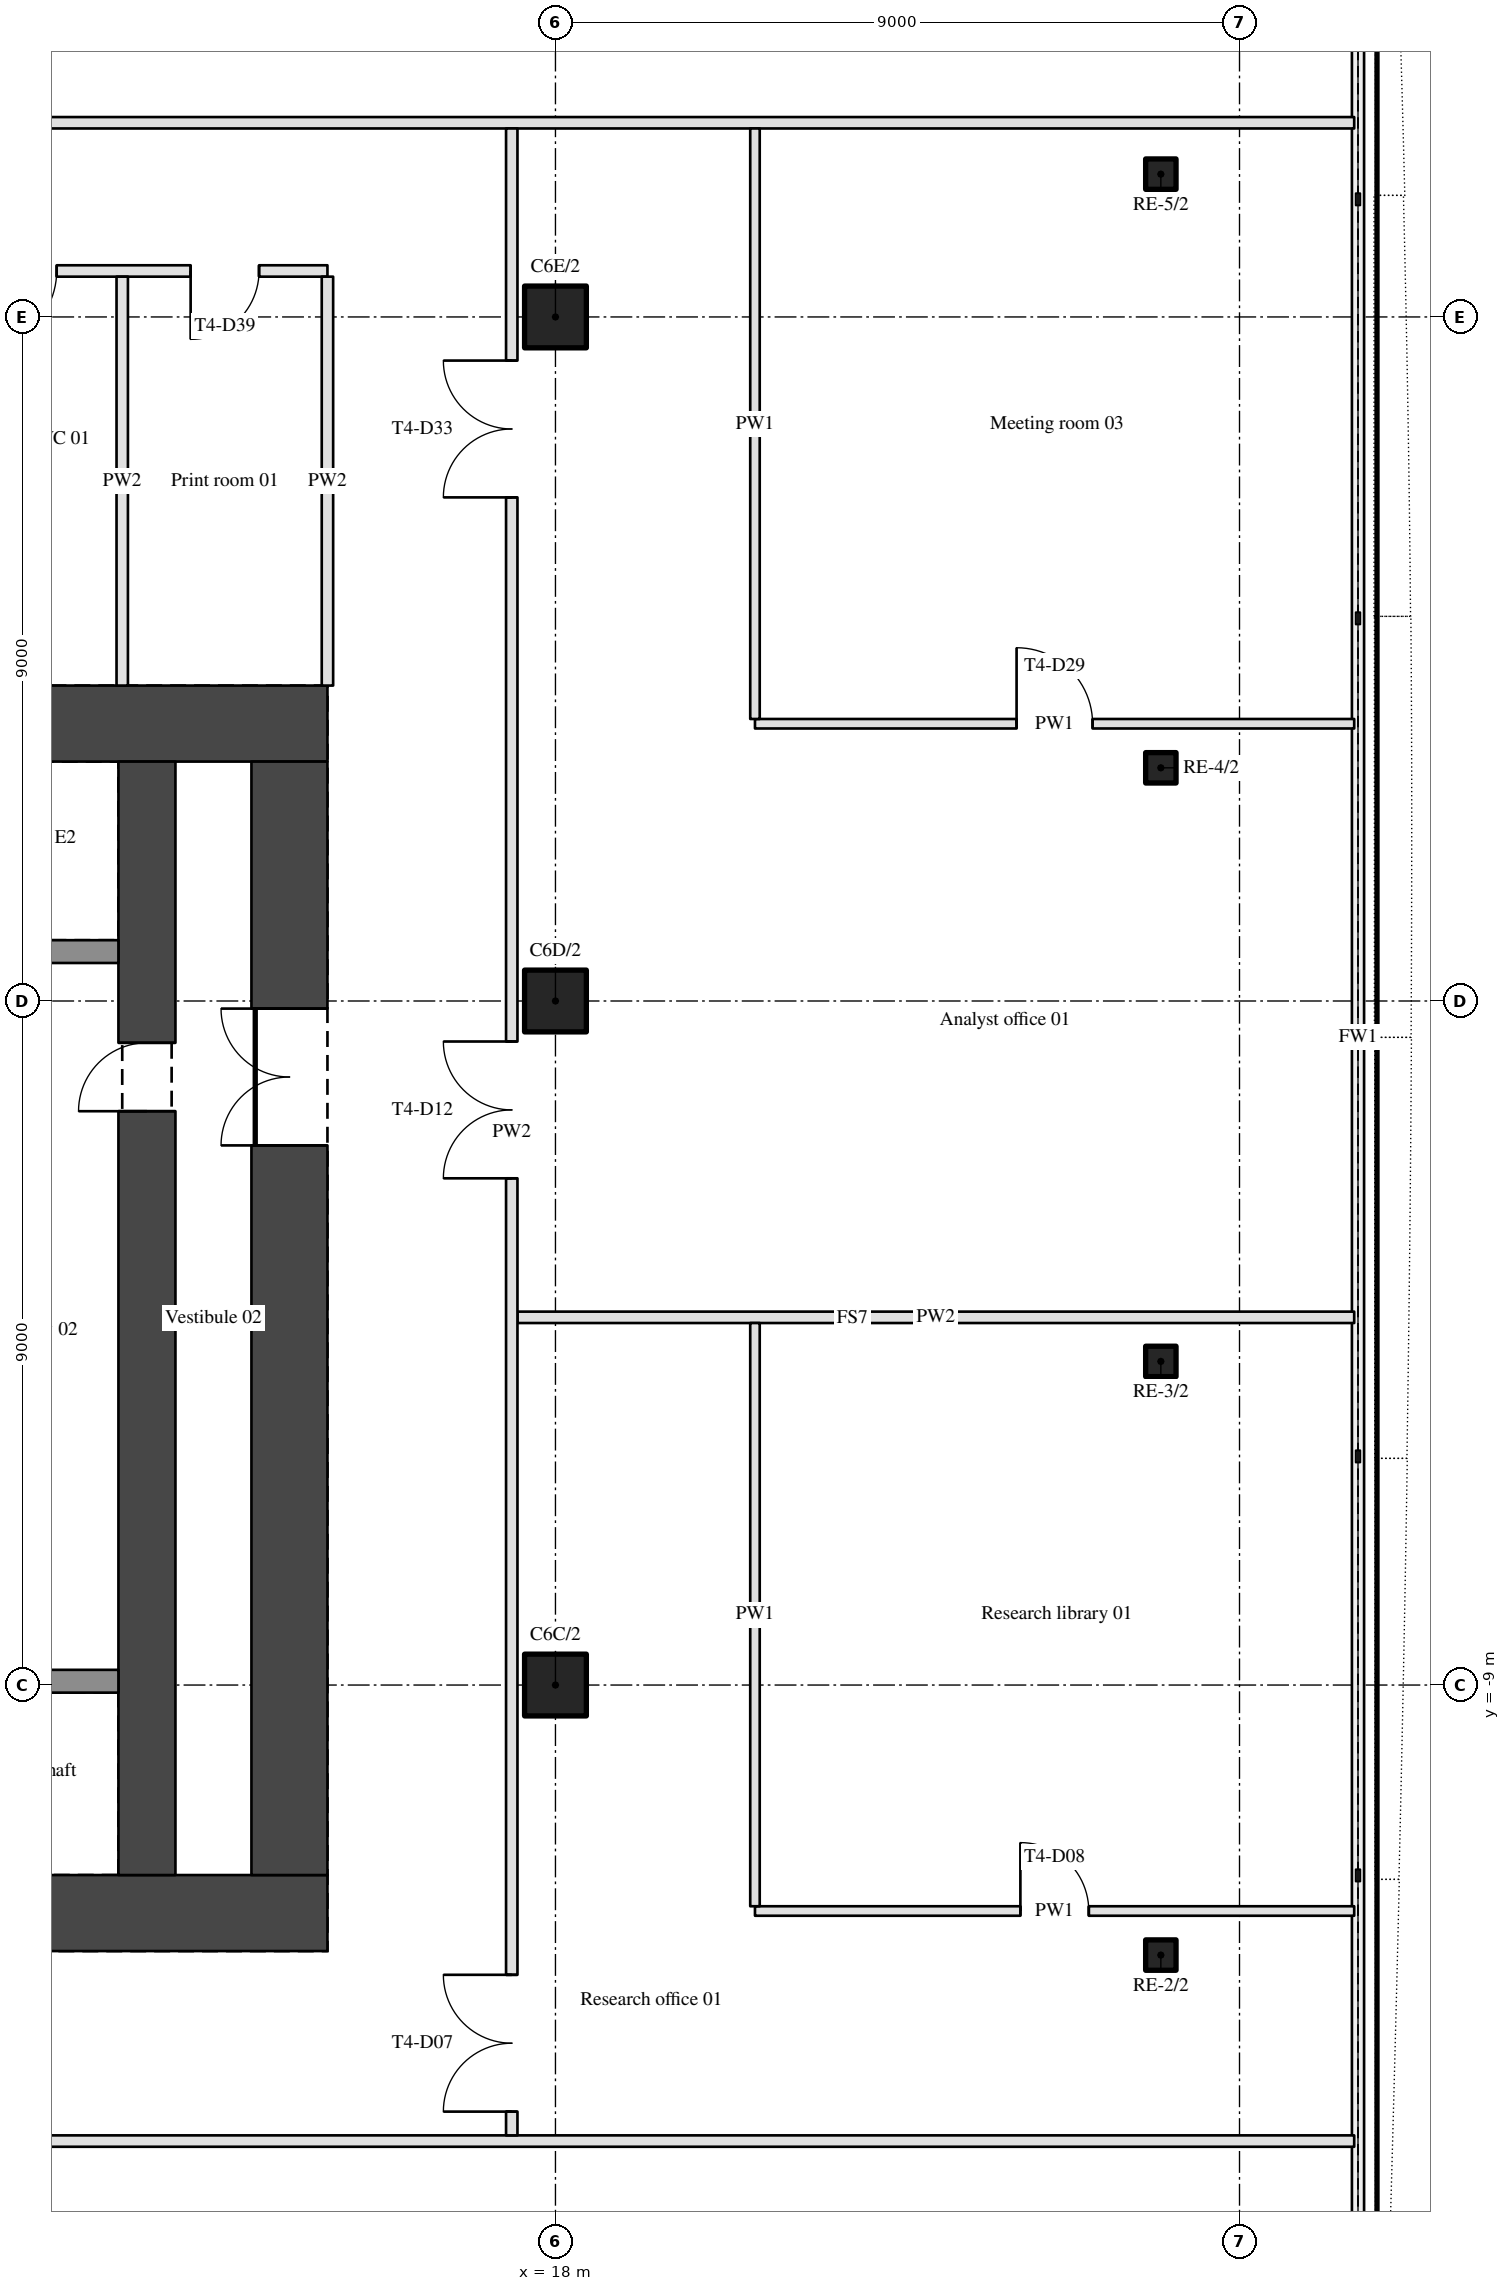
"""IFC4 building model, lengths in metres.
Left out: names, types, materials, properties, quantities, classifications, styles, units other than length and angle.
Written with IfcOpenShell. Run it as: python <this file> out.ifc"""

import sys

from ifc_helpers import new_model, si_unit, direction, frame, frame_2d, origin, origin_2d, place, context, subcontext, project, spatial, rectangle, hollow_rectangle, hollow_circle, extrude, element, fill, save


model = new_model("IFC4")
c1 = context("Model", 3, precision=1e-05, world=origin(), true_north=direction((0.0, 1.0)))
c2 = subcontext(c1, "Body", "Model", "MODEL_VIEW")
j1 = project(units=[si_unit("LENGTHUNIT", "METRE"), si_unit("PLANEANGLEUNIT", "RADIAN")], contexts=[c1])
p1 = place(None, origin())
s1 = spatial("IfcSite", under=j1, at=p1, CompositionType="ELEMENT")
p2 = place(p1, origin())
s2 = spatial("IfcBuilding", under=s1, at=p2, CompositionType="ELEMENT")
p3 = place(p2, frame((0.0, 0.0, 62.1)))
s3 = spatial("IfcBuildingStorey", under=s2, at=p3, CompositionType="ELEMENT", Elevation=62.1)
for number, where, z_axis, x_axis in (
    (1, (18.0, -9.0, 0.0), (0.0, 0.0, 1.0), (1.0, 0.0, 0.0)),
    (2, (18.0, 0.0, 0.0), (0.0, 0.0, 1.0), (1.0, 0.0, 0.0)),
    (3, (18.0, 9.0, 0.0), (0.0, 0.0, 1.0), (1.0, 0.0, 0.0)),
):
    element("IfcColumn", number, at=place(p3, frame(where, z_axis=z_axis, x_axis=x_axis)), inside=s3, PredefinedType="COLUMN", context=c2, shape_type="SweptSolid", body=[
        extrude(hollow_circle(Radius=0.406, WallThickness=0.036, at=origin_2d()), origin(), (0.0, 0.0, 1.0), 3.9),
    ])
for number, where, z_axis, x_axis in (
    (4, (25.965, -12.553, 0.0), (0.0, 0.0, 1.0), (1.0, 0.0, 0.0)),
    (5, (25.965, -4.742, 0.0), (0.0, 0.0, 1.0), (1.0, 0.0, 0.0)),
    (6, (25.965, 3.068, 0.0), (0.0, 0.0, 1.0), (1.0, 0.0, 0.0)),
    (7, (25.965, 10.879, 0.0), (0.0, 0.0, 1.0), (1.0, 0.0, 0.0)),
):
    element("IfcColumn", number, at=place(p3, frame(where, z_axis=z_axis, x_axis=x_axis)), inside=s3, PredefinedType="COLUMN", context=c2, shape_type="SweptSolid", body=[
        extrude(hollow_rectangle(XDim=0.4, YDim=0.4, WallThickness=0.025, InnerFilletRadius=0.038, OuterFilletRadius=0.062, at=origin_2d()), origin(), (0.0, 0.0, 1.0), 3.9),
    ])
for number, where, z_axis, x_axis in (
    (8, (-15.0, -12.0, 0.0), (0.0, 0.0, 1.0), (1.0, 0.0, 0.0)),
    (9, (-15.0, 3.65, 0.0), (0.0, 0.0, 1.0), (1.0, 0.0, 0.0)),
):
    element("IfcWall", number, at=place(p3, frame(where, z_axis=z_axis, x_axis=x_axis)), inside=s3, PredefinedType="SHEAR", context=c2, shape_type="SweptSolid", body=[
        extrude(rectangle(XDim=30.0, YDim=1.0, at=frame_2d((15.0, 0.0))), origin(), (0.0, 0.0, 1.0), 3.9),
    ])
p4 = place(p3, frame((14.5, -11.5, 0.0), z_axis=(0.0, 0.0, 1.0), x_axis=(0.0, 1.0, 0.0)))
e10 = element("IfcWall", 10, at=p4, inside=s3, PredefinedType="SHEAR", context=c2, shape_type="SweptSolid", body=[
    extrude(rectangle(XDim=14.65, YDim=1.0, at=frame_2d((7.325, 0.0))), origin(), (0.0, 0.0, 1.0), 3.9),
])
p5 = place(p4, frame((9.6, 0.0, 0.0)))
e11 = element("IfcOpeningElement", 11, at=p5, cuts=e10, PredefinedType="OPENING", context=c2, shape_type="SweptSolid", body=[
    extrude(rectangle(XDim=1.8, YDim=2.1, at=frame_2d((0.9, 1.05))), frame((0.0, 0.51, 0.0), z_axis=(0.0, -1.0, 0.0), x_axis=(1.0, 0.0, 0.0)), (0.0, 0.0, 1.0), 1.02),
])
p6 = place(p3, frame((12.625, -11.5, 0.0), z_axis=(0.0, 0.0, 1.0), x_axis=(0.0, 1.0, 0.0)))
e12 = element("IfcWall", 12, at=p6, inside=s3, PredefinedType="SHEAR", context=c2, shape_type="SweptSolid", body=[
    extrude(rectangle(XDim=14.65, YDim=0.75, at=frame_2d((7.325, 0.0))), origin(), (0.0, 0.0, 1.0), 3.9),
])
p7 = place(p6, frame((10.05, 0.0, 0.0)))
e13 = element("IfcOpeningElement", 13, at=p7, cuts=e12, PredefinedType="OPENING", context=c2, shape_type="SweptSolid", body=[
    extrude(rectangle(XDim=0.9, YDim=2.1, at=frame_2d((0.45, 1.05))), frame((0.0, 0.385, 0.0), z_axis=(0.0, -1.0, 0.0), x_axis=(1.0, 0.0, 0.0)), (0.0, 0.0, 1.0), 0.77),
])
p8 = place(p3, frame((-22.509, -15.0, 0.0), z_axis=(0.0, 0.0, 1.0), x_axis=(1.0, 0.0, 0.0)))
e14 = element("IfcWall", 14, at=p8, inside=s3, PredefinedType="PARTITIONING", context=c2, shape_type="SweptSolid", body=[
    extrude(rectangle(XDim=51.018, YDim=0.15, at=frame_2d((25.509, 0.0))), origin(), (0.0, 0.0, 1.0), 2.96),
])
p9 = place(p8, frame((12.896, 0.0, 0.0)))
e15 = element("IfcOpeningElement", 15, at=p9, cuts=e14, PredefinedType="OPENING", context=c2, shape_type="SweptSolid", body=[
    extrude(rectangle(XDim=1.8, YDim=2.1, at=frame_2d((0.9, 1.05))), frame((0.0, 0.085, 0.0), z_axis=(0.0, -1.0, 0.0), x_axis=(1.0, 0.0, 0.0)), (0.0, 0.0, 1.0), 0.17),
])
p10 = place(p8, frame((30.322, 0.0, 0.0)))
e16 = element("IfcOpeningElement", 16, at=p10, cuts=e14, PredefinedType="OPENING", context=c2, shape_type="SweptSolid", body=[
    extrude(rectangle(XDim=1.8, YDim=2.1, at=frame_2d((0.9, 1.05))), frame((0.0, 0.085, 0.0), z_axis=(0.0, -1.0, 0.0), x_axis=(1.0, 0.0, 0.0)), (0.0, 0.0, 1.0), 0.17),
])
p11 = place(p3, frame((20.625, -11.973, 0.0), z_axis=(0.0, 0.0, 1.0), x_axis=(1.0, 0.0, 0.0)))
e17 = element("IfcWall", 17, at=p11, inside=s3, PredefinedType="PARTITIONING", context=c2, shape_type="SweptSolid", body=[
    extrude(rectangle(XDim=7.884, YDim=0.125, at=frame_2d((3.942, 0.0))), origin(), (0.0, 0.0, 1.0), 2.96),
])
p12 = place(p11, frame((3.492, 0.0, 0.0)))
e18 = element("IfcOpeningElement", 18, at=p12, cuts=e17, PredefinedType="OPENING", context=c2, shape_type="SweptSolid", body=[
    extrude(rectangle(XDim=0.9, YDim=2.1, at=frame_2d((0.45, 1.05))), frame((0.0, 0.073, 0.0), z_axis=(0.0, -1.0, 0.0), x_axis=(1.0, 0.0, 0.0)), (0.0, 0.0, 1.0), 0.145),
])
p13 = place(p3, frame((9.5, -8.95, 0.0), z_axis=(0.0, 0.0, 1.0), x_axis=(1.0, 0.0, 0.0)))
e19 = element("IfcWall", 19, at=p13, inside=s3, PredefinedType="SHEAR", context=c2, shape_type="SweptSolid", body=[
    extrude(rectangle(XDim=2.75, YDim=0.3, at=frame_2d((1.375, 0.0))), origin(), (0.0, 0.0, 1.0), 3.9),
])
p14 = place(p3, frame((17.5, -4.162, 0.0), z_axis=(0.0, 0.0, 1.0), x_axis=(1.0, 0.0, 0.0)))
e20 = element("IfcWall", 20, at=p14, inside=s3, PredefinedType="PARTITIONING", context=c2, shape_type="SweptSolid", body=[
    extrude(rectangle(XDim=11.009, YDim=0.15, at=frame_2d((5.504, 0.0))), origin(), (0.0, 0.0, 1.0), 2.96),
])
p15 = place(p3, frame((12.25, 0.65, 0.0), z_axis=(0.0, 0.0, 1.0), x_axis=(-1.0, 0.0, 0.0)))
e21 = element("IfcWall", 21, at=p15, inside=s3, PredefinedType="SHEAR", context=c2, shape_type="SweptSolid", body=[
    extrude(rectangle(XDim=3.25, YDim=0.3, at=frame_2d((1.625, 0.0))), origin(), (0.0, 0.0, 1.0), 3.9),
])
p16 = place(p3, frame((20.625, 3.648, 0.0), z_axis=(0.0, 0.0, 1.0), x_axis=(1.0, 0.0, 0.0)))
e22 = element("IfcWall", 22, at=p16, inside=s3, PredefinedType="PARTITIONING", context=c2, shape_type="SweptSolid", body=[
    extrude(rectangle(XDim=7.884, YDim=0.125, at=frame_2d((3.942, 0.0))), origin(), (0.0, 0.0, 1.0), 2.96),
])
p17 = place(p16, frame((3.442, 0.0, 0.0)))
e23 = element("IfcOpeningElement", 23, at=p17, cuts=e22, PredefinedType="OPENING", context=c2, shape_type="SweptSolid", body=[
    extrude(rectangle(XDim=1.0, YDim=2.1, at=frame_2d((0.5, 1.05))), frame((0.0, 0.073, 0.0), z_axis=(0.0, -1.0, 0.0), x_axis=(1.0, 0.0, 0.0)), (0.0, 0.0, 1.0), 0.145),
])
p18 = place(p3, frame((15.0, 9.605, 0.0), z_axis=(0.0, 0.0, 1.0), x_axis=(-1.0, 0.0, 0.0)))
e24 = element("IfcWall", 24, at=p18, inside=s3, PredefinedType="PARTITIONING", context=c2, shape_type="SweptSolid", body=[
    extrude(rectangle(XDim=10.4, YDim=0.15, at=frame_2d((5.2, 0.0))), origin(), (0.0, 0.0, 1.0), 2.96),
])
p19 = place(p18, frame((0.9, 0.0, 0.0)))
e25 = element("IfcOpeningElement", 25, at=p19, cuts=e24, PredefinedType="OPENING", context=c2, shape_type="SweptSolid", body=[
    extrude(rectangle(XDim=0.9, YDim=2.1, at=frame_2d((0.45, 1.05))), frame((0.0, 0.085, 0.0), z_axis=(0.0, -1.0, 0.0), x_axis=(1.0, 0.0, 0.0)), (0.0, 0.0, 1.0), 0.17),
])
p20 = place(p18, frame((7.462, 0.0, 0.0)))
e26 = element("IfcOpeningElement", 26, at=p20, cuts=e24, PredefinedType="OPENING", context=c2, shape_type="SweptSolid", body=[
    extrude(rectangle(XDim=0.9, YDim=2.1, at=frame_2d((0.45, 1.05))), frame((0.0, 0.085, 0.0), z_axis=(0.0, -1.0, 0.0), x_axis=(1.0, 0.0, 0.0)), (0.0, 0.0, 1.0), 0.17),
])
p21 = place(p18, frame((3.562, 0.0, 0.0)))
e27 = element("IfcOpeningElement", 27, at=p21, cuts=e24, PredefinedType="OPENING", context=c2, shape_type="SweptSolid", body=[
    extrude(rectangle(XDim=1.0, YDim=2.1, at=frame_2d((0.5, 1.05))), frame((0.0, 0.085, 0.0), z_axis=(0.0, -1.0, 0.0), x_axis=(1.0, 0.0, 0.0)), (0.0, 0.0, 1.0), 0.17),
])
p22 = place(p3, frame((28.509, 11.555, 0.0), z_axis=(0.0, 0.0, 1.0), x_axis=(-1.0, 0.0, 0.0)))
e28 = element("IfcWall", 28, at=p22, inside=s3, PredefinedType="PARTITIONING", context=c2, shape_type="SweptSolid", body=[
    extrude(rectangle(XDim=51.018, YDim=0.15, at=frame_2d((25.509, 0.0))), origin(), (0.0, 0.0, 1.0), 2.96),
])
p23 = place(p22, frame((36.322, 0.0, 0.0)))
e29 = element("IfcOpeningElement", 29, at=p23, cuts=e28, PredefinedType="OPENING", context=c2, shape_type="SweptSolid", body=[
    extrude(rectangle(XDim=1.8, YDim=2.1, at=frame_2d((0.9, 1.05))), frame((0.0, 0.085, 0.0), z_axis=(0.0, -1.0, 0.0), x_axis=(1.0, 0.0, 0.0)), (0.0, 0.0, 1.0), 0.17),
])
p24 = place(p22, frame((18.896, 0.0, 0.0)))
e30 = element("IfcOpeningElement", 30, at=p24, cuts=e28, PredefinedType="OPENING", context=c2, shape_type="SweptSolid", body=[
    extrude(rectangle(XDim=1.8, YDim=2.1, at=frame_2d((0.9, 1.05))), frame((0.0, 0.085, 0.0), z_axis=(0.0, -1.0, 0.0), x_axis=(1.0, 0.0, 0.0)), (0.0, 0.0, 1.0), 0.17),
])
for number, where, z_axis, x_axis in (
    (31, (12.3, 4.15, 0.0), (0.0, 0.0, 1.0), (0.0, 1.0, 0.0)),
    (32, (15.0, 4.15, 0.0), (0.0, 0.0, 1.0), (0.0, 1.0, 0.0)),
):
    element("IfcWall", number, at=place(p3, frame(where, z_axis=z_axis, x_axis=x_axis)), inside=s3, PredefinedType="PARTITIONING", context=c2, shape_type="SweptSolid", body=[
        extrude(rectangle(XDim=5.38, YDim=0.15, at=frame_2d((2.69, 0.0))), origin(), (0.0, 0.0, 1.0), 2.96),
    ])
p25 = place(p3, frame((17.425, -14.925, 0.0), z_axis=(0.0, 0.0, 1.0), x_axis=(0.0, 1.0, 0.0)))
e33 = element("IfcWall", 33, at=p25, inside=s3, PredefinedType="PARTITIONING", context=c2, shape_type="SweptSolid", body=[
    extrude(rectangle(XDim=26.405, YDim=0.15, at=frame_2d((13.203, 0.0))), origin(), (0.0, 0.0, 1.0), 2.96),
])
p26 = place(p25, frame((0.312, 0.0, 0.0)))
e34 = element("IfcOpeningElement", 34, at=p26, cuts=e33, PredefinedType="OPENING", context=c2, shape_type="SweptSolid", body=[
    extrude(rectangle(XDim=1.8, YDim=2.1, at=frame_2d((0.9, 1.05))), frame((0.0, 0.085, 0.0), z_axis=(0.0, -1.0, 0.0), x_axis=(1.0, 0.0, 0.0)), (0.0, 0.0, 1.0), 0.17),
])
p27 = place(p25, frame((12.592, 0.0, 0.0)))
e35 = element("IfcOpeningElement", 35, at=p27, cuts=e33, PredefinedType="OPENING", context=c2, shape_type="SweptSolid", body=[
    extrude(rectangle(XDim=1.8, YDim=2.1, at=frame_2d((0.9, 1.05))), frame((0.0, 0.085, 0.0), z_axis=(0.0, -1.0, 0.0), x_axis=(1.0, 0.0, 0.0)), (0.0, 0.0, 1.0), 0.17),
])
p28 = place(p25, frame((21.551, 0.0, 0.0)))
e36 = element("IfcOpeningElement", 36, at=p28, cuts=e33, PredefinedType="OPENING", context=c2, shape_type="SweptSolid", body=[
    extrude(rectangle(XDim=1.8, YDim=2.1, at=frame_2d((0.9, 1.05))), frame((0.0, 0.085, 0.0), z_axis=(0.0, -1.0, 0.0), x_axis=(1.0, 0.0, 0.0)), (0.0, 0.0, 1.0), 0.17),
])
p29 = place(p3, frame((20.625, -11.91, 0.0), z_axis=(0.0, 0.0, 1.0), x_axis=(0.0, 1.0, 0.0)))
e37 = element("IfcWall", 37, at=p29, inside=s3, PredefinedType="PARTITIONING", context=c2, shape_type="SweptSolid", body=[
    extrude(rectangle(XDim=7.673, YDim=0.125, at=frame_2d((3.837, 0.0))), origin(), (0.0, 0.0, 1.0), 2.96),
])
p30 = place(p3, frame((20.625, 3.71, 0.0), z_axis=(0.0, 0.0, 1.0), x_axis=(0.0, 1.0, 0.0)))
e38 = element("IfcWall", 38, at=p30, inside=s3, PredefinedType="PARTITIONING", context=c2, shape_type="SweptSolid", body=[
    extrude(rectangle(XDim=7.77, YDim=0.125, at=frame_2d((3.885, 0.0))), origin(), (0.0, 0.0, 1.0), 2.96),
])
p31 = place(p26, origin())
e39 = element("IfcDoor", 39, at=p31, inside=s3, OperationType="DOUBLE_DOOR_SINGLE_SWING", PredefinedType="DOOR", context=c2, shape_type="SweptSolid", body=[
    extrude(rectangle(XDim=1.8, YDim=2.1, at=frame_2d((0.9, 1.05))), frame((0.0, 0.025, 0.0), z_axis=(0.0, -1.0, 0.0), x_axis=(1.0, 0.0, 0.0)), (0.0, 0.0, 1.0), 0.05),
])
fill(e34, e39)
p32 = place(p27, origin())
e40 = element("IfcDoor", 40, at=p32, inside=s3, OperationType="DOUBLE_DOOR_SINGLE_SWING", PredefinedType="DOOR", context=c2, shape_type="SweptSolid", body=[
    extrude(rectangle(XDim=1.8, YDim=2.1, at=frame_2d((0.9, 1.05))), frame((0.0, 0.025, 0.0), z_axis=(0.0, -1.0, 0.0), x_axis=(1.0, 0.0, 0.0)), (0.0, 0.0, 1.0), 0.05),
])
fill(e35, e40)
p33 = place(p28, origin())
e41 = element("IfcDoor", 41, at=p33, inside=s3, OperationType="DOUBLE_DOOR_SINGLE_SWING", PredefinedType="DOOR", context=c2, shape_type="SweptSolid", body=[
    extrude(rectangle(XDim=1.8, YDim=2.1, at=frame_2d((0.9, 1.05))), frame((0.0, 0.025, 0.0), z_axis=(0.0, -1.0, 0.0), x_axis=(1.0, 0.0, 0.0)), (0.0, 0.0, 1.0), 0.05),
])
fill(e36, e41)
p34 = place(p5, origin())
e42 = element("IfcDoor", 42, at=p34, inside=s3, OperationType="DOUBLE_DOOR_SINGLE_SWING", PredefinedType="DOOR", context=c2, shape_type="SweptSolid", body=[
    extrude(rectangle(XDim=1.8, YDim=2.1, at=frame_2d((0.9, 1.05))), frame((0.0, 0.025, 0.0), z_axis=(0.0, -1.0, 0.0), x_axis=(1.0, 0.0, 0.0)), (0.0, 0.0, 1.0), 0.05),
])
fill(e11, e42)
p35 = place(p19, origin())
e43 = element("IfcDoor", 43, at=p35, inside=s3, OperationType="SINGLE_SWING_RIGHT", PredefinedType="DOOR", context=c2, shape_type="SweptSolid", body=[
    extrude(rectangle(XDim=0.9, YDim=2.1, at=frame_2d((0.45, 1.05))), frame((0.0, 0.025, 0.0), z_axis=(0.0, -1.0, 0.0), x_axis=(1.0, 0.0, 0.0)), (0.0, 0.0, 1.0), 0.05),
])
fill(e25, e43)
p36 = place(p21, origin())
e44 = element("IfcDoor", 44, at=p36, inside=s3, OperationType="SINGLE_SWING_RIGHT", PredefinedType="DOOR", context=c2, shape_type="SweptSolid", body=[
    extrude(rectangle(XDim=1.0, YDim=2.1, at=frame_2d((0.5, 1.05))), frame((0.0, 0.025, 0.0), z_axis=(0.0, -1.0, 0.0), x_axis=(1.0, 0.0, 0.0)), (0.0, 0.0, 1.0), 0.05),
])
fill(e27, e44)
p37 = place(p12, origin())
e45 = element("IfcDoor", 45, at=p37, inside=s3, OperationType="SINGLE_SWING_LEFT", PredefinedType="DOOR", context=c2, shape_type="SweptSolid", body=[
    extrude(rectangle(XDim=0.9, YDim=2.1, at=frame_2d((0.45, 1.05))), frame((0.0, 0.025, 0.0), z_axis=(0.0, -1.0, 0.0), x_axis=(1.0, 0.0, 0.0)), (0.0, 0.0, 1.0), 0.05),
])
fill(e18, e45)
p38 = place(p17, origin())
e46 = element("IfcDoor", 46, at=p38, inside=s3, OperationType="SINGLE_SWING_LEFT", PredefinedType="DOOR", context=c2, shape_type="SweptSolid", body=[
    extrude(rectangle(XDim=1.0, YDim=2.1, at=frame_2d((0.5, 1.05))), frame((0.0, 0.025, 0.0), z_axis=(0.0, -1.0, 0.0), x_axis=(1.0, 0.0, 0.0)), (0.0, 0.0, 1.0), 0.05),
])
fill(e23, e46)
p39 = place(p7, origin())
e47 = element("IfcDoor", 47, at=p39, inside=s3, OperationType="SINGLE_SWING_LEFT", PredefinedType="DOOR", context=c2, shape_type="SweptSolid", body=[
    extrude(rectangle(XDim=0.9, YDim=2.1, at=frame_2d((0.45, 1.05))), frame((0.0, 0.025, 0.0), z_axis=(0.0, -1.0, 0.0), x_axis=(1.0, 0.0, 0.0)), (0.0, 0.0, 1.0), 0.05),
])
fill(e13, e47)
save(model, sys.argv[1])
